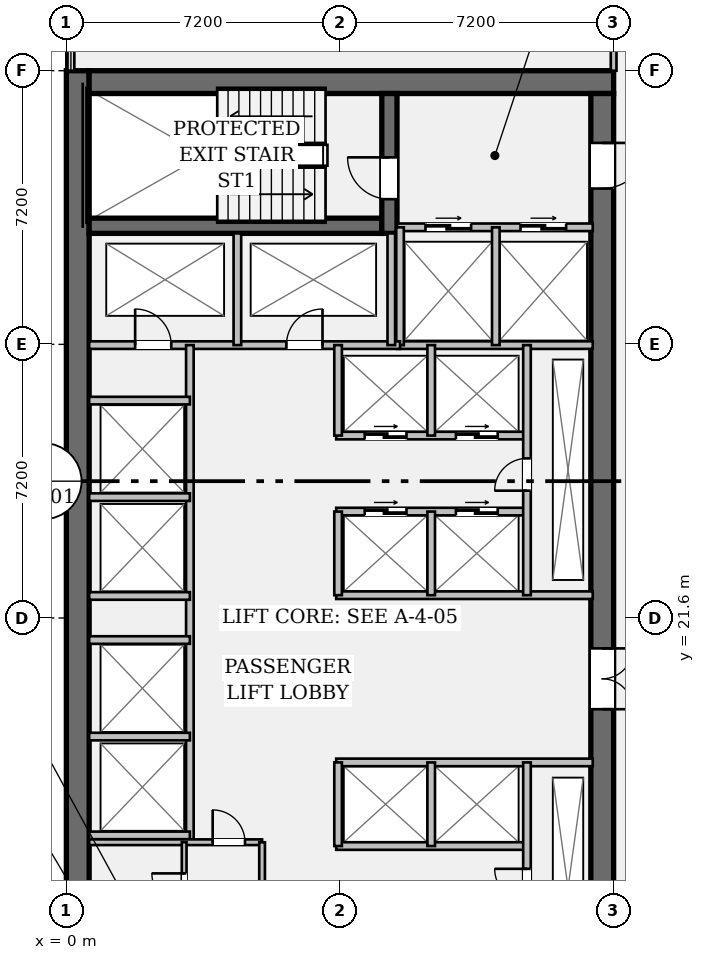
"""IFC4 building model, lengths in metres.
Left out: names, types, materials, properties, quantities, classifications, styles, units other than length and angle.
Written with IfcOpenShell. Run it as: python <this file> out.ifc"""

import sys

from ifc_helpers import new_model, si_unit, direction, frame, frame_2d, origin, place, context, subcontext, project, spatial, rectangle, extrude, element, fill, save


model = new_model("IFC4")
c1 = context("Model", 3, precision=1e-05, world=origin(), true_north=direction((0.0, 1.0)))
c2 = subcontext(c1, "Body", "Model", "MODEL_VIEW")
j1 = project(units=[si_unit("LENGTHUNIT", "METRE"), si_unit("PLANEANGLEUNIT", "RADIAN")], contexts=[c1])
p1 = place(None, origin())
s1 = spatial("IfcSite", under=j1, at=p1, CompositionType="ELEMENT")
p2 = place(p1, origin())
s2 = spatial("IfcBuilding", under=s1, at=p2, CompositionType="ELEMENT")
p3 = place(p2, frame((0.0, 0.0, 61.95)))
s3 = spatial("IfcBuildingStorey", under=s2, at=p3, CompositionType="ELEMENT", Elevation=61.95)
p4 = place(p3, frame((0.3, 7.2, 0.0), z_axis=(0.0, 0.0, 1.0), x_axis=(0.0, 1.0, 0.0)))
e1 = element("IfcWall", 1, at=p4, inside=s3, PredefinedType="SHEAR", context=c2, shape_type="SweptSolid", body=[
    extrude(rectangle(XDim=28.8, YDim=0.6, at=frame_2d((14.4, 0.0))), origin(), (0.0, 0.0, 1.0), 3.57),
])
p5 = place(p3, frame((0.6, 35.7, 0.0), z_axis=(0.0, 0.0, 1.0), x_axis=(1.0, 0.0, 0.0)))
e2 = element("IfcWall", 2, at=p5, inside=s3, PredefinedType="SHEAR", context=c2, shape_type="SweptSolid", body=[
    extrude(rectangle(XDim=13.8, YDim=0.6, at=frame_2d((6.9, 0.0))), origin(), (0.0, 0.0, 1.0), 3.57),
])
p6 = place(p3, frame((14.1, 35.4, 0.0), z_axis=(0.0, 0.0, 1.0), x_axis=(0.0, -1.0, 0.0)))
e3 = element("IfcWall", 3, at=p6, inside=s3, PredefinedType="SHEAR", context=c2, shape_type="SweptSolid", body=[
    extrude(rectangle(XDim=27.6, YDim=0.6, at=frame_2d((13.8, 0.0))), origin(), (0.0, 0.0, 1.0), 3.57),
])
p7 = place(p6, frame((1.3, 0.0, 0.0)))
e4 = element("IfcOpeningElement", 4, at=p7, cuts=e3, PredefinedType="OPENING", context=c2, shape_type="SweptSolid", body=[
    extrude(rectangle(XDim=1.2, YDim=2.15, at=frame_2d((0.6, 1.075))), frame((0.0, 0.312, 0.0), z_axis=(0.0, -1.0, 0.0), x_axis=(1.0, 0.0, 0.0)), (0.0, 0.0, 1.0), 0.624),
])
p8 = place(p6, frame((25.25, 0.0, 0.0)))
e5 = element("IfcOpeningElement", 5, at=p8, cuts=e3, PredefinedType="OPENING", context=c2, shape_type="SweptSolid", body=[
    extrude(rectangle(XDim=1.2, YDim=2.15, at=frame_2d((0.6, 1.075))), frame((0.0, 0.312, 0.0), z_axis=(0.0, -1.0, 0.0), x_axis=(1.0, 0.0, 0.0)), (0.0, 0.0, 1.0), 0.624),
])
p9 = place(p6, frame((14.6, 0.0, 0.0)))
e6 = element("IfcOpeningElement", 6, at=p9, cuts=e3, PredefinedType="OPENING", context=c2, shape_type="SweptSolid", body=[
    extrude(rectangle(XDim=1.6, YDim=2.2, at=frame_2d((0.8, 1.1))), frame((0.0, 0.312, 0.0), z_axis=(0.0, -1.0, 0.0), x_axis=(1.0, 0.0, 0.0)), (0.0, 0.0, 1.0), 0.624),
])
p10 = place(p3, frame((0.6, 31.92, 0.0), z_axis=(0.0, 0.0, 1.0), x_axis=(1.0, 0.0, 0.0)))
e7 = element("IfcWall", 7, at=p10, inside=s3, PredefinedType="SHEAR", context=c2, shape_type="SweptSolid", body=[
    extrude(rectangle(XDim=7.7, YDim=0.4, at=frame_2d((3.85, 0.0))), origin(), (0.0, 0.0, 1.0), 3.57),
])
p11 = place(p3, frame((8.5, 31.72, 0.0), z_axis=(0.0, 0.0, 1.0), x_axis=(0.0, 1.0, 0.0)))
e8 = element("IfcWall", 8, at=p11, inside=s3, PredefinedType="SHEAR", context=c2, shape_type="SweptSolid", body=[
    extrude(rectangle(XDim=3.68, YDim=0.4, at=frame_2d((1.84, 0.0))), origin(), (0.0, 0.0, 1.0), 3.57),
])
p12 = place(p11, frame((0.9, 0.0, 0.0)))
e9 = element("IfcOpeningElement", 9, at=p12, cuts=e8, PredefinedType="OPENING", context=c2, shape_type="SweptSolid", body=[
    extrude(rectangle(XDim=1.1, YDim=2.15, at=frame_2d((0.55, 1.075))), frame((0.0, 0.212, 0.0), z_axis=(0.0, -1.0, 0.0), x_axis=(1.0, 0.0, 0.0)), (0.0, 0.0, 1.0), 0.424),
])
p13 = place(p3, frame((8.7, 31.88, 0.0), z_axis=(0.0, 0.0, 1.0), x_axis=(1.0, 0.0, 0.0)))
e10 = element("IfcWall", 10, at=p13, inside=s3, PredefinedType="PARTITIONING", context=c2, shape_type="SweptSolid", body=[
    extrude(rectangle(XDim=5.15, YDim=0.2, at=frame_2d((2.575, 0.0))), origin(), (0.0, 0.0, 1.0), 3.57),
])
p14 = place(p13, frame((0.75, 0.0, 0.0)))
e11 = element("IfcOpeningElement", 11, at=p14, cuts=e10, PredefinedType="OPENING", context=c2, shape_type="SweptSolid", body=[
    extrude(rectangle(XDim=1.2, YDim=2.2, at=frame_2d((0.6, 1.1))), frame((0.0, 0.112, 0.0), z_axis=(0.0, -1.0, 0.0), x_axis=(1.0, 0.0, 0.0)), (0.0, 0.0, 1.0), 0.224),
])
p15 = place(p13, frame((3.25, 0.0, 0.0)))
e12 = element("IfcOpeningElement", 12, at=p15, cuts=e10, PredefinedType="OPENING", context=c2, shape_type="SweptSolid", body=[
    extrude(rectangle(XDim=1.2, YDim=2.2, at=frame_2d((0.6, 1.1))), frame((0.0, 0.112, 0.0), z_axis=(0.0, -1.0, 0.0), x_axis=(1.0, 0.0, 0.0)), (0.0, 0.0, 1.0), 0.224),
])
p16 = place(p3, frame((8.7, 28.78, 0.0), z_axis=(0.0, 0.0, 1.0), x_axis=(1.0, 0.0, 0.0)))
e13 = element("IfcWall", 13, at=p16, inside=s3, PredefinedType="PARTITIONING", context=c2, shape_type="SweptSolid", body=[
    extrude(rectangle(XDim=5.15, YDim=0.2, at=frame_2d((2.575, 0.0))), origin(), (0.0, 0.0, 1.0), 3.57),
])
for number, where, z_axis, x_axis in (
    (14, (8.78, 28.78, 0.0), (0.0, 0.0, 1.0), (0.0, 1.0, 0.0)),
    (15, (11.3, 28.78, 0.0), (0.0, 0.0, 1.0), (0.0, 1.0, 0.0)),
):
    element("IfcWall", number, at=place(p3, frame(where, z_axis=z_axis, x_axis=x_axis)), inside=s3, PredefinedType="PARTITIONING", context=c2, shape_type="SweptSolid", body=[
        extrude(rectangle(XDim=3.1, YDim=0.2, at=frame_2d((1.55, 0.0))), origin(), (0.0, 0.0, 1.0), 3.57),
    ])
p17 = place(p3, frame((0.6, 28.78, 0.0), z_axis=(0.0, 0.0, 1.0), x_axis=(1.0, 0.0, 0.0)))
e16 = element("IfcWall", 16, at=p17, inside=s3, PredefinedType="PARTITIONING", context=c2, shape_type="SweptSolid", body=[
    extrude(rectangle(XDim=8.18, YDim=0.2, at=frame_2d((4.09, 0.0))), origin(), (0.0, 0.0, 1.0), 3.57),
])
p18 = place(p17, frame((1.21, 0.0, 0.0)))
e17 = element("IfcOpeningElement", 17, at=p18, cuts=e16, PredefinedType="OPENING", context=c2, shape_type="SweptSolid", body=[
    extrude(rectangle(XDim=0.95, YDim=2.15, at=frame_2d((0.475, 1.075))), frame((0.0, 0.112, 0.0), z_axis=(0.0, -1.0, 0.0), x_axis=(1.0, 0.0, 0.0)), (0.0, 0.0, 1.0), 0.224),
])
p19 = place(p17, frame((5.19, 0.0, 0.0)))
e18 = element("IfcOpeningElement", 18, at=p19, cuts=e16, PredefinedType="OPENING", context=c2, shape_type="SweptSolid", body=[
    extrude(rectangle(XDim=0.95, YDim=2.15, at=frame_2d((0.475, 1.075))), frame((0.0, 0.112, 0.0), z_axis=(0.0, -1.0, 0.0), x_axis=(1.0, 0.0, 0.0)), (0.0, 0.0, 1.0), 0.224),
])
for number, where, z_axis, x_axis in (
    (19, (4.5, 28.78, 0.0), (0.0, 0.0, 1.0), (0.0, 1.0, 0.0)),
    (20, (8.55, 28.78, 0.0), (0.0, 0.0, 1.0), (0.0, 1.0, 0.0)),
):
    element("IfcWall", number, at=place(p3, frame(where, z_axis=z_axis, x_axis=x_axis)), inside=s3, PredefinedType="PARTITIONING", context=c2, shape_type="SweptSolid", body=[
        extrude(rectangle(XDim=2.94, YDim=0.2, at=frame_2d((1.47, 0.0))), origin(), (0.0, 0.0, 1.0), 3.57),
    ])
p20 = place(p3, frame((3.25, 15.7, 0.0), z_axis=(0.0, 0.0, 1.0), x_axis=(0.0, 1.0, 0.0)))
e21 = element("IfcWall", 21, at=p20, inside=s3, PredefinedType="PARTITIONING", context=c2, shape_type="SweptSolid", body=[
    extrude(rectangle(XDim=13.08, YDim=0.2, at=frame_2d((6.54, 0.0))), origin(), (0.0, 0.0, 1.0), 3.57),
])
for number, where, z_axis, x_axis in (
    (22, (0.6, 15.88, 0.0), (0.0, 0.0, 1.0), (1.0, 0.0, 0.0)),
    (23, (0.6, 18.48, 0.0), (0.0, 0.0, 1.0), (1.0, 0.0, 0.0)),
    (24, (0.6, 22.18, 0.0), (0.0, 0.0, 1.0), (1.0, 0.0, 0.0)),
    (25, (0.6, 24.78, 0.0), (0.0, 0.0, 1.0), (1.0, 0.0, 0.0)),
    (26, (0.6, 21.02, 0.0), (0.0, 0.0, 1.0), (1.0, 0.0, 0.0)),
    (27, (0.6, 27.32, 0.0), (0.0, 0.0, 1.0), (1.0, 0.0, 0.0)),
):
    element("IfcWall", number, at=place(p3, frame(where, z_axis=z_axis, x_axis=x_axis)), inside=s3, PredefinedType="PARTITIONING", context=c2, shape_type="SweptSolid", body=[
        extrude(rectangle(XDim=2.65, YDim=0.2, at=frame_2d((1.325, 0.0))), origin(), (0.0, 0.0, 1.0), 3.57),
    ])
p21 = place(p3, frame((7.1, 22.2, 0.0), z_axis=(0.0, 0.0, 1.0), x_axis=(1.0, 0.0, 0.0)))
e28 = element("IfcWall", 28, at=p21, inside=s3, PredefinedType="PARTITIONING", context=c2, shape_type="SweptSolid", body=[
    extrude(rectangle(XDim=6.75, YDim=0.2, at=frame_2d((3.375, 0.0))), origin(), (0.0, 0.0, 1.0), 3.57),
])
p22 = place(p3, frame((7.1, 24.4, 0.0), z_axis=(0.0, 0.0, 1.0), x_axis=(1.0, 0.0, 0.0)))
e29 = element("IfcWall", 29, at=p22, inside=s3, PredefinedType="PARTITIONING", context=c2, shape_type="SweptSolid", body=[
    extrude(rectangle(XDim=5.02, YDim=0.2, at=frame_2d((2.51, 0.0))), origin(), (0.0, 0.0, 1.0), 3.57),
])
p23 = place(p22, frame((0.75, 0.0, 0.0)))
e30 = element("IfcOpeningElement", 30, at=p23, cuts=e29, PredefinedType="OPENING", context=c2, shape_type="SweptSolid", body=[
    extrude(rectangle(XDim=1.1, YDim=2.2, at=frame_2d((0.55, 1.1))), frame((0.0, 0.112, 0.0), z_axis=(0.0, -1.0, 0.0), x_axis=(1.0, 0.0, 0.0)), (0.0, 0.0, 1.0), 0.224),
])
p24 = place(p22, frame((3.15, 0.0, 0.0)))
e31 = element("IfcOpeningElement", 31, at=p24, cuts=e29, PredefinedType="OPENING", context=c2, shape_type="SweptSolid", body=[
    extrude(rectangle(XDim=1.1, YDim=2.2, at=frame_2d((0.55, 1.1))), frame((0.0, 0.112, 0.0), z_axis=(0.0, -1.0, 0.0), x_axis=(1.0, 0.0, 0.0)), (0.0, 0.0, 1.0), 0.224),
])
p25 = place(p3, frame((7.1, 26.4, 0.0), z_axis=(0.0, 0.0, 1.0), x_axis=(1.0, 0.0, 0.0)))
e32 = element("IfcWall", 32, at=p25, inside=s3, PredefinedType="PARTITIONING", context=c2, shape_type="SweptSolid", body=[
    extrude(rectangle(XDim=5.02, YDim=0.2, at=frame_2d((2.51, 0.0))), origin(), (0.0, 0.0, 1.0), 3.57),
])
p26 = place(p25, frame((0.75, 0.0, 0.0)))
e33 = element("IfcOpeningElement", 33, at=p26, cuts=e32, PredefinedType="OPENING", context=c2, shape_type="SweptSolid", body=[
    extrude(rectangle(XDim=1.1, YDim=2.2, at=frame_2d((0.55, 1.1))), frame((0.0, 0.112, 0.0), z_axis=(0.0, -1.0, 0.0), x_axis=(1.0, 0.0, 0.0)), (0.0, 0.0, 1.0), 0.224),
])
p27 = place(p25, frame((3.15, 0.0, 0.0)))
e34 = element("IfcOpeningElement", 34, at=p27, cuts=e32, PredefinedType="OPENING", context=c2, shape_type="SweptSolid", body=[
    extrude(rectangle(XDim=1.1, YDim=2.2, at=frame_2d((0.55, 1.1))), frame((0.0, 0.112, 0.0), z_axis=(0.0, -1.0, 0.0), x_axis=(1.0, 0.0, 0.0)), (0.0, 0.0, 1.0), 0.224),
])
p28 = place(p3, frame((7.15, 22.2, 0.0), z_axis=(0.0, 0.0, 1.0), x_axis=(0.0, 1.0, 0.0)))
e35 = element("IfcWall", 35, at=p28, inside=s3, PredefinedType="PARTITIONING", context=c2, shape_type="SweptSolid", body=[
    extrude(rectangle(XDim=2.2, YDim=0.2, at=frame_2d((1.1, 0.0))), origin(), (0.0, 0.0, 1.0), 3.57),
])
p29 = place(p3, frame((7.15, 26.4, 0.0), z_axis=(0.0, 0.0, 1.0), x_axis=(0.0, 1.0, 0.0)))
e36 = element("IfcWall", 36, at=p29, inside=s3, PredefinedType="PARTITIONING", context=c2, shape_type="SweptSolid", body=[
    extrude(rectangle(XDim=2.38, YDim=0.2, at=frame_2d((1.19, 0.0))), origin(), (0.0, 0.0, 1.0), 3.57),
])
p30 = place(p3, frame((9.6, 22.2, 0.0), z_axis=(0.0, 0.0, 1.0), x_axis=(0.0, 1.0, 0.0)))
e37 = element("IfcWall", 37, at=p30, inside=s3, PredefinedType="PARTITIONING", context=c2, shape_type="SweptSolid", body=[
    extrude(rectangle(XDim=2.2, YDim=0.2, at=frame_2d((1.1, 0.0))), origin(), (0.0, 0.0, 1.0), 3.57),
])
p31 = place(p3, frame((9.6, 26.4, 0.0), z_axis=(0.0, 0.0, 1.0), x_axis=(0.0, 1.0, 0.0)))
e38 = element("IfcWall", 38, at=p31, inside=s3, PredefinedType="PARTITIONING", context=c2, shape_type="SweptSolid", body=[
    extrude(rectangle(XDim=2.38, YDim=0.2, at=frame_2d((1.19, 0.0))), origin(), (0.0, 0.0, 1.0), 3.57),
])
p32 = place(p3, frame((12.12, 22.2, 0.0), z_axis=(0.0, 0.0, 1.0), x_axis=(0.0, 1.0, 0.0)))
e39 = element("IfcWall", 39, at=p32, inside=s3, PredefinedType="PARTITIONING", context=c2, shape_type="SweptSolid", body=[
    extrude(rectangle(XDim=6.58, YDim=0.2, at=frame_2d((3.29, 0.0))), origin(), (0.0, 0.0, 1.0), 3.57),
])
p33 = place(p32, frame((2.75, 0.0, 0.0)))
e40 = element("IfcOpeningElement", 40, at=p33, cuts=e39, PredefinedType="OPENING", context=c2, shape_type="SweptSolid", body=[
    extrude(rectangle(XDim=0.85, YDim=2.15, at=frame_2d((0.425, 1.075))), frame((0.0, 0.112, 0.0), z_axis=(0.0, -1.0, 0.0), x_axis=(1.0, 0.0, 0.0)), (0.0, 0.0, 1.0), 0.224),
])
p34 = place(p3, frame((7.1, 17.8, 0.0), z_axis=(0.0, 0.0, 1.0), x_axis=(1.0, 0.0, 0.0)))
e41 = element("IfcWall", 41, at=p34, inside=s3, PredefinedType="PARTITIONING", context=c2, shape_type="SweptSolid", body=[
    extrude(rectangle(XDim=6.75, YDim=0.2, at=frame_2d((3.375, 0.0))), origin(), (0.0, 0.0, 1.0), 3.57),
])
p35 = place(p3, frame((7.1, 15.6, 0.0), z_axis=(0.0, 0.0, 1.0), x_axis=(1.0, 0.0, 0.0)))
e42 = element("IfcWall", 42, at=p35, inside=s3, PredefinedType="PARTITIONING", context=c2, shape_type="SweptSolid", body=[
    extrude(rectangle(XDim=5.02, YDim=0.2, at=frame_2d((2.51, 0.0))), origin(), (0.0, 0.0, 1.0), 3.57),
])
for number, where, z_axis, x_axis in (
    (43, (7.15, 15.6, 0.0), (0.0, 0.0, 1.0), (0.0, 1.0, 0.0)),
    (44, (9.6, 15.6, 0.0), (0.0, 0.0, 1.0), (0.0, 1.0, 0.0)),
):
    element("IfcWall", number, at=place(p3, frame(where, z_axis=z_axis, x_axis=x_axis)), inside=s3, PredefinedType="PARTITIONING", context=c2, shape_type="SweptSolid", body=[
        extrude(rectangle(XDim=2.2, YDim=0.2, at=frame_2d((1.1, 0.0))), origin(), (0.0, 0.0, 1.0), 3.57),
    ])
p36 = place(p3, frame((12.12, 11.2, 0.0), z_axis=(0.0, 0.0, 1.0), x_axis=(0.0, 1.0, 0.0)))
e45 = element("IfcWall", 45, at=p36, inside=s3, PredefinedType="PARTITIONING", context=c2, shape_type="SweptSolid", body=[
    extrude(rectangle(XDim=6.6, YDim=0.2, at=frame_2d((3.3, 0.0))), origin(), (0.0, 0.0, 1.0), 3.57),
])
p37 = place(p36, frame((2.95, 0.0, 0.0)))
e46 = element("IfcOpeningElement", 46, at=p37, cuts=e45, PredefinedType="OPENING", context=c2, shape_type="SweptSolid", body=[
    extrude(rectangle(XDim=0.85, YDim=2.15, at=frame_2d((0.425, 1.075))), frame((0.0, 0.112, 0.0), z_axis=(0.0, -1.0, 0.0), x_axis=(1.0, 0.0, 0.0)), (0.0, 0.0, 1.0), 0.224),
])
p38 = place(p3, frame((0.6, 15.7, 0.0), z_axis=(0.0, 0.0, 1.0), x_axis=(1.0, 0.0, 0.0)))
e47 = element("IfcWall", 47, at=p38, inside=s3, PredefinedType="PARTITIONING", context=c2, shape_type="SweptSolid", body=[
    extrude(rectangle(XDim=4.55, YDim=0.15, at=frame_2d((2.275, 0.0))), origin(), (0.0, 0.0, 1.0), 3.57),
])
p39 = place(p38, frame((3.25, 0.0, 0.0)))
e48 = element("IfcOpeningElement", 48, at=p39, cuts=e47, PredefinedType="OPENING", context=c2, shape_type="SweptSolid", body=[
    extrude(rectangle(XDim=0.85, YDim=2.15, at=frame_2d((0.425, 1.075))), frame((0.0, 0.087, 0.0), z_axis=(0.0, -1.0, 0.0), x_axis=(1.0, 0.0, 0.0)), (0.0, 0.0, 1.0), 0.174),
])
p40 = place(p3, frame((5.15, 11.28, 0.0), z_axis=(0.0, 0.0, 1.0), x_axis=(0.0, 1.0, 0.0)))
e49 = element("IfcWall", 49, at=p40, inside=s3, PredefinedType="PARTITIONING", context=c2, shape_type="SweptSolid", body=[
    extrude(rectangle(XDim=4.42, YDim=0.15, at=frame_2d((2.21, 0.0))), origin(), (0.0, 0.0, 1.0), 3.57),
])
p41 = place(p3, frame((3.1, 11.28, 0.0), z_axis=(0.0, 0.0, 1.0), x_axis=(0.0, 1.0, 0.0)))
e50 = element("IfcWall", 50, at=p41, inside=s3, PredefinedType="PARTITIONING", context=c2, shape_type="SweptSolid", body=[
    extrude(rectangle(XDim=4.42, YDim=0.125, at=frame_2d((2.21, 0.0))), origin(), (0.0, 0.0, 1.0), 3.57),
])
p42 = place(p41, frame((0.65, 0.0, 0.0)))
e51 = element("IfcOpeningElement", 51, at=p42, cuts=e50, PredefinedType="OPENING", context=c2, shape_type="SweptSolid", body=[
    extrude(rectangle(XDim=0.85, YDim=2.15, at=frame_2d((0.425, 1.075))), frame((0.0, 0.074, 0.0), z_axis=(0.0, -1.0, 0.0), x_axis=(1.0, 0.0, 0.0)), (0.0, 0.0, 1.0), 0.149),
])
p43 = place(p41, frame((2.75, 0.0, 0.0)))
e52 = element("IfcOpeningElement", 52, at=p43, cuts=e50, PredefinedType="OPENING", context=c2, shape_type="SweptSolid", body=[
    extrude(rectangle(XDim=0.85, YDim=2.15, at=frame_2d((0.425, 1.075))), frame((0.0, 0.074, 0.0), z_axis=(0.0, -1.0, 0.0), x_axis=(1.0, 0.0, 0.0)), (0.0, 0.0, 1.0), 0.149),
])
p44 = place(p3, frame((14.4, 36.0, 0.0), z_axis=(0.0, 0.0, 1.0), x_axis=(0.0, 1.0, 0.0)))
e53 = element("IfcWall", 53, at=p44, inside=s3, PredefinedType="PARTITIONING", context=c2, shape_type="SweptSolid", body=[
    extrude(rectangle(XDim=7.08, YDim=0.15, at=frame_2d((3.54, 0.0))), origin(), (0.0, 0.0, 1.0), 2.699),
])
p45 = place(p44, frame((0.65, 0.0, 0.0)))
e54 = element("IfcOpeningElement", 54, at=p45, cuts=e53, PredefinedType="OPENING", context=c2, shape_type="SweptSolid", body=[
    extrude(rectangle(XDim=0.9, YDim=2.15, at=frame_2d((0.45, 1.075))), frame((0.0, 0.087, 0.0), z_axis=(0.0, -1.0, 0.0), x_axis=(1.0, 0.0, 0.0)), (0.0, 0.0, 1.0), 0.174),
])
p46 = place(p12, origin())
e55 = element("IfcDoor", 55, at=p46, inside=s3, OperationType="SINGLE_SWING_RIGHT", PredefinedType="DOOR", context=c2, shape_type="SweptSolid", body=[
    extrude(rectangle(XDim=1.1, YDim=2.15, at=frame_2d((0.55, 1.075))), frame((0.0, 0.025, 0.0), z_axis=(0.0, -1.0, 0.0), x_axis=(1.0, 0.0, 0.0)), (0.0, 0.0, 1.0), 0.05),
])
fill(e9, e55)
p47 = place(p7, origin())
e56 = element("IfcDoor", 56, at=p47, inside=s3, OperationType="SINGLE_SWING_LEFT", PredefinedType="DOOR", context=c2, shape_type="SweptSolid", body=[
    extrude(rectangle(XDim=1.2, YDim=2.15, at=frame_2d((0.6, 1.075))), frame((0.0, 0.025, 0.0), z_axis=(0.0, -1.0, 0.0), x_axis=(1.0, 0.0, 0.0)), (0.0, 0.0, 1.0), 0.05),
])
fill(e4, e56)
p48 = place(p14, origin())
e57 = element("IfcDoor", 57, at=p48, inside=s3, OperationType="DOUBLE_DOOR_SLIDING", PredefinedType="DOOR", context=c2, shape_type="SweptSolid", body=[
    extrude(rectangle(XDim=1.2, YDim=2.2, at=frame_2d((0.6, 1.1))), frame((0.0, 0.025, 0.0), z_axis=(0.0, -1.0, 0.0), x_axis=(1.0, 0.0, 0.0)), (0.0, 0.0, 1.0), 0.05),
])
fill(e11, e57)
p49 = place(p15, origin())
e58 = element("IfcDoor", 58, at=p49, inside=s3, OperationType="DOUBLE_DOOR_SLIDING", PredefinedType="DOOR", context=c2, shape_type="SweptSolid", body=[
    extrude(rectangle(XDim=1.2, YDim=2.2, at=frame_2d((0.6, 1.1))), frame((0.0, 0.025, 0.0), z_axis=(0.0, -1.0, 0.0), x_axis=(1.0, 0.0, 0.0)), (0.0, 0.0, 1.0), 0.05),
])
fill(e12, e58)
p50 = place(p18, origin())
e59 = element("IfcDoor", 59, at=p50, inside=s3, OperationType="SINGLE_SWING_LEFT", PredefinedType="DOOR", context=c2, shape_type="SweptSolid", body=[
    extrude(rectangle(XDim=0.95, YDim=2.15, at=frame_2d((0.475, 1.075))), frame((0.0, 0.025, 0.0), z_axis=(0.0, -1.0, 0.0), x_axis=(1.0, 0.0, 0.0)), (0.0, 0.0, 1.0), 0.05),
])
fill(e17, e59)
p51 = place(p19, origin())
e60 = element("IfcDoor", 60, at=p51, inside=s3, OperationType="SINGLE_SWING_RIGHT", PredefinedType="DOOR", context=c2, shape_type="SweptSolid", body=[
    extrude(rectangle(XDim=0.95, YDim=2.15, at=frame_2d((0.475, 1.075))), frame((0.0, 0.025, 0.0), z_axis=(0.0, -1.0, 0.0), x_axis=(1.0, 0.0, 0.0)), (0.0, 0.0, 1.0), 0.05),
])
fill(e18, e60)
p52 = place(p9, origin())
e61 = element("IfcDoor", 61, at=p52, inside=s3, OperationType="DOUBLE_DOOR_SINGLE_SWING", PredefinedType="DOOR", context=c2, shape_type="SweptSolid", body=[
    extrude(rectangle(XDim=1.6, YDim=2.2, at=frame_2d((0.8, 1.1))), frame((0.0, 0.025, 0.0), z_axis=(0.0, -1.0, 0.0), x_axis=(1.0, 0.0, 0.0)), (0.0, 0.0, 1.0), 0.05),
])
fill(e6, e61)
p53 = place(p33, origin())
e62 = element("IfcDoor", 62, at=p53, inside=s3, OperationType="SINGLE_SWING_LEFT", PredefinedType="DOOR", context=c2, shape_type="SweptSolid", body=[
    extrude(rectangle(XDim=0.85, YDim=2.15, at=frame_2d((0.425, 1.075))), frame((0.0, 0.025, 0.0), z_axis=(0.0, -1.0, 0.0), x_axis=(1.0, 0.0, 0.0)), (0.0, 0.0, 1.0), 0.05),
])
fill(e40, e62)
p54 = place(p23, origin())
e63 = element("IfcDoor", 63, at=p54, inside=s3, OperationType="DOUBLE_DOOR_SLIDING", PredefinedType="DOOR", context=c2, shape_type="SweptSolid", body=[
    extrude(rectangle(XDim=1.1, YDim=2.2, at=frame_2d((0.55, 1.1))), frame((0.0, 0.025, 0.0), z_axis=(0.0, -1.0, 0.0), x_axis=(1.0, 0.0, 0.0)), (0.0, 0.0, 1.0), 0.05),
])
fill(e30, e63)
p55 = place(p24, origin())
e64 = element("IfcDoor", 64, at=p55, inside=s3, OperationType="DOUBLE_DOOR_SLIDING", PredefinedType="DOOR", context=c2, shape_type="SweptSolid", body=[
    extrude(rectangle(XDim=1.1, YDim=2.2, at=frame_2d((0.55, 1.1))), frame((0.0, 0.025, 0.0), z_axis=(0.0, -1.0, 0.0), x_axis=(1.0, 0.0, 0.0)), (0.0, 0.0, 1.0), 0.05),
])
fill(e31, e64)
p56 = place(p26, origin())
e65 = element("IfcDoor", 65, at=p56, inside=s3, OperationType="DOUBLE_DOOR_SLIDING", PredefinedType="DOOR", context=c2, shape_type="SweptSolid", body=[
    extrude(rectangle(XDim=1.1, YDim=2.2, at=frame_2d((0.55, 1.1))), frame((0.0, 0.025, 0.0), z_axis=(0.0, -1.0, 0.0), x_axis=(1.0, 0.0, 0.0)), (0.0, 0.0, 1.0), 0.05),
])
fill(e33, e65)
p57 = place(p27, origin())
e66 = element("IfcDoor", 66, at=p57, inside=s3, OperationType="DOUBLE_DOOR_SLIDING", PredefinedType="DOOR", context=c2, shape_type="SweptSolid", body=[
    extrude(rectangle(XDim=1.1, YDim=2.2, at=frame_2d((0.55, 1.1))), frame((0.0, 0.025, 0.0), z_axis=(0.0, -1.0, 0.0), x_axis=(1.0, 0.0, 0.0)), (0.0, 0.0, 1.0), 0.05),
])
fill(e34, e66)
p58 = place(p37, origin())
e67 = element("IfcDoor", 67, at=p58, inside=s3, OperationType="SINGLE_SWING_RIGHT", PredefinedType="DOOR", context=c2, shape_type="SweptSolid", body=[
    extrude(rectangle(XDim=0.85, YDim=2.15, at=frame_2d((0.425, 1.075))), frame((0.0, 0.025, 0.0), z_axis=(0.0, -1.0, 0.0), x_axis=(1.0, 0.0, 0.0)), (0.0, 0.0, 1.0), 0.05),
])
fill(e46, e67)
p59 = place(p39, origin())
e68 = element("IfcDoor", 68, at=p59, inside=s3, OperationType="SINGLE_SWING_LEFT", PredefinedType="DOOR", context=c2, shape_type="SweptSolid", body=[
    extrude(rectangle(XDim=0.85, YDim=2.15, at=frame_2d((0.425, 1.075))), frame((0.0, 0.025, 0.0), z_axis=(0.0, -1.0, 0.0), x_axis=(1.0, 0.0, 0.0)), (0.0, 0.0, 1.0), 0.05),
])
fill(e48, e68)
p60 = place(p43, origin())
e69 = element("IfcDoor", 69, at=p60, inside=s3, OperationType="SINGLE_SWING_RIGHT", PredefinedType="DOOR", context=c2, shape_type="SweptSolid", body=[
    extrude(rectangle(XDim=0.85, YDim=2.15, at=frame_2d((0.425, 1.075))), frame((0.0, 0.025, 0.0), z_axis=(0.0, -1.0, 0.0), x_axis=(1.0, 0.0, 0.0)), (0.0, 0.0, 1.0), 0.05),
])
fill(e52, e69)
save(model, sys.argv[1])
